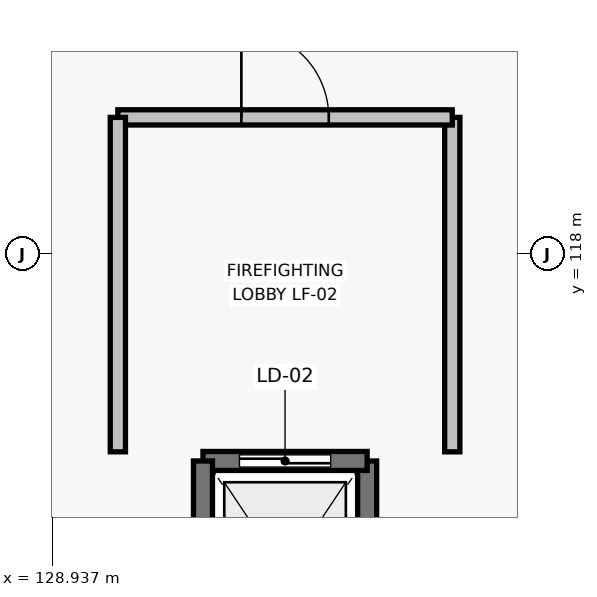
"""IFC4 building model, lengths in metres.
Left out: names, types, materials, properties, quantities, classifications, styles, units other than length and angle.
Written with IfcOpenShell. Run it as: python <this file> out.ifc"""

import sys

from ifc_helpers import new_model, si_unit, direction, frame, frame_2d, origin, place, context, subcontext, project, spatial, rectangle, extrude, element, fill, save


model = new_model("IFC4")
c1 = context("Model", 3, precision=1e-05, world=origin(), true_north=direction((0.0, 1.0)))
c2 = subcontext(c1, "Body", "Model", "MODEL_VIEW")
j1 = project(units=[si_unit("LENGTHUNIT", "METRE"), si_unit("PLANEANGLEUNIT", "RADIAN")], contexts=[c1])
p1 = place(None, origin())
s1 = spatial("IfcSite", under=j1, at=p1, CompositionType="ELEMENT")
p2 = place(p1, origin())
s2 = spatial("IfcBuilding", under=s1, at=p2, CompositionType="ELEMENT")
p3 = place(p2, frame((0.0, 0.0, 5.4)))
s3 = spatial("IfcBuildingStorey", under=s2, at=p3, CompositionType="ELEMENT", Elevation=5.4)
p4 = place(p3, frame((133.08, 112.32, 0.0), z_axis=(0.0, 0.0, 1.0), x_axis=(0.0, 1.0, 0.0)))
e1 = element("IfcWall", 1, at=p4, inside=s3, PredefinedType="SHEAR", context=c2, shape_type="SweptSolid", body=[
    extrude(rectangle(XDim=2.96, YDim=0.25, at=frame_2d((1.48, 0.0))), origin(), (0.0, 0.0, 1.0), 5.16),
])
p5 = place(p3, frame((133.08, 115.28, 0.0), z_axis=(0.0, 0.0, 1.0), x_axis=(-1.0, 0.0, 0.0)))
e2 = element("IfcWall", 2, at=p5, inside=s3, PredefinedType="SHEAR", context=c2, shape_type="SweptSolid", body=[
    extrude(rectangle(XDim=2.16, YDim=0.25, at=frame_2d((1.08, 0.0))), origin(), (0.0, 0.0, 1.0), 5.16),
])
p6 = place(p5, frame((0.48, 0.0, 0.0)))
e3 = element("IfcOpeningElement", 3, at=p6, cuts=e2, PredefinedType="OPENING", context=c2, shape_type="SweptSolid", body=[
    extrude(rectangle(XDim=1.2, YDim=2.2, at=frame_2d((0.6, 1.1))), frame((0.0, 0.135, 0.0), z_axis=(0.0, -1.0, 0.0), x_axis=(1.0, 0.0, 0.0)), (0.0, 0.0, 1.0), 0.27),
])
p7 = place(p3, frame((130.92, 115.28, 0.0), z_axis=(0.0, 0.0, 1.0), x_axis=(0.0, -1.0, 0.0)))
e4 = element("IfcWall", 4, at=p7, inside=s3, PredefinedType="SHEAR", context=c2, shape_type="SweptSolid", body=[
    extrude(rectangle(XDim=2.96, YDim=0.25, at=frame_2d((1.48, 0.0))), origin(), (0.0, 0.0, 1.0), 5.16),
])
p8 = place(p3, frame((134.2, 115.4, 0.0), z_axis=(0.0, 0.0, 1.0), x_axis=(0.0, 1.0, 0.0)))
e5 = element("IfcWall", 5, at=p8, inside=s3, PredefinedType="PARTITIONING", context=c2, shape_type="SweptSolid", body=[
    extrude(rectangle(XDim=4.4, YDim=0.2, at=frame_2d((2.2, 0.0))), origin(), (0.0, 0.0, 1.0), 4.795),
])
p9 = place(p3, frame((134.2, 119.8, 0.0), z_axis=(0.0, 0.0, 1.0), x_axis=(-1.0, 0.0, 0.0)))
e6 = element("IfcWall", 6, at=p9, inside=s3, PredefinedType="PARTITIONING", context=c2, shape_type="SweptSolid", body=[
    extrude(rectangle(XDim=4.4, YDim=0.2, at=frame_2d((2.2, 0.0))), origin(), (0.0, 0.0, 1.0), 5.16),
])
p10 = place(p9, frame((1.625, 0.0, 0.0)))
e7 = element("IfcOpeningElement", 7, at=p10, cuts=e6, PredefinedType="OPENING", context=c2, shape_type="SweptSolid", body=[
    extrude(rectangle(XDim=1.15, YDim=2.2, at=frame_2d((0.575, 1.1))), frame((0.0, 0.11, 0.0), z_axis=(0.0, -1.0, 0.0), x_axis=(1.0, 0.0, 0.0)), (0.0, 0.0, 1.0), 0.22),
])
p11 = place(p3, frame((129.8, 119.8, 0.0), z_axis=(0.0, 0.0, 1.0), x_axis=(0.0, -1.0, 0.0)))
e8 = element("IfcWall", 8, at=p11, inside=s3, PredefinedType="PARTITIONING", context=c2, shape_type="SweptSolid", body=[
    extrude(rectangle(XDim=4.4, YDim=0.2, at=frame_2d((2.2, 0.0))), origin(), (0.0, 0.0, 1.0), 5.16),
])
p12 = place(p6, origin())
e9 = element("IfcDoor", 9, at=p12, inside=s3, OperationType="SLIDING_TO_LEFT", PredefinedType="DOOR", context=c2, shape_type="SweptSolid", body=[
    extrude(rectangle(XDim=1.2, YDim=2.2, at=frame_2d((0.6, 1.1))), frame((0.0, 0.025, 0.0), z_axis=(0.0, -1.0, 0.0), x_axis=(1.0, 0.0, 0.0)), (0.0, 0.0, 1.0), 0.05),
])
fill(e3, e9)
p13 = place(p10, origin())
e10 = element("IfcDoor", 10, at=p13, inside=s3, OperationType="SINGLE_SWING_RIGHT", PredefinedType="DOOR", context=c2, shape_type="SweptSolid", body=[
    extrude(rectangle(XDim=1.15, YDim=2.2, at=frame_2d((0.575, 1.1))), frame((0.0, 0.025, 0.0), z_axis=(0.0, -1.0, 0.0), x_axis=(1.0, 0.0, 0.0)), (0.0, 0.0, 1.0), 0.05),
])
fill(e7, e10)
save(model, sys.argv[1])
